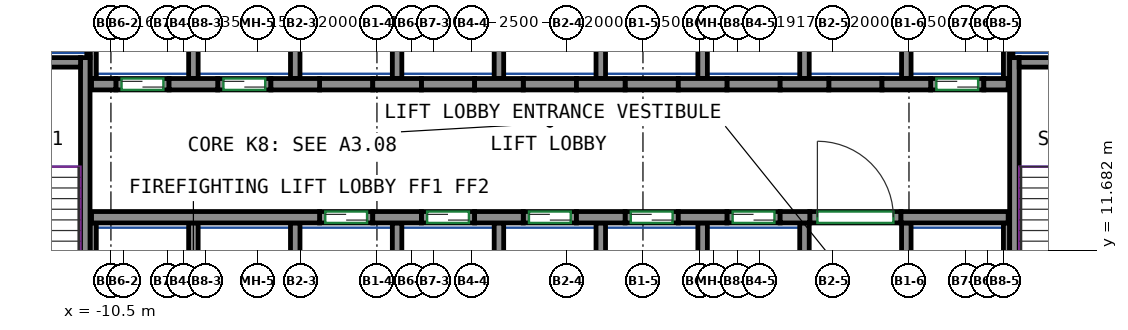
"""IFC4 building model, lengths in metres.
Left out: names, types, materials, properties, quantities, classifications, styles, units other than length and angle.
Written with IfcOpenShell. Run it as: python <this file> out.ifc"""

import sys

from ifc_helpers import new_model, si_unit, direction, frame, frame_2d, origin, place, context, subcontext, project, spatial, rectangle, extrude, source, transform, mapped, element, fill, save


model = new_model("IFC4")
c1 = context("Model", 3, precision=1e-05, world=origin(), true_north=direction((0.0, 1.0)))
c2 = subcontext(c1, "Body", "Model", "MODEL_VIEW")
j1 = project(units=[si_unit("LENGTHUNIT", "METRE"), si_unit("PLANEANGLEUNIT", "RADIAN")], contexts=[c1])
p1 = place(None, origin())
s1 = spatial("IfcSite", under=j1, at=p1, CompositionType="ELEMENT")
p2 = place(p1, origin())
s2 = spatial("IfcBuilding", under=s1, at=p2, CompositionType="ELEMENT")
p3 = place(p2, frame((0.0, 0.0, 35.0)))
s3 = spatial("IfcBuildingStorey", under=s2, at=p3, CompositionType="ELEMENT", Elevation=35.0)
m1 = source(origin(), c2, "Body", "SweptSolid", [
    extrude(rectangle(XDim=7.75, YDim=0.25, at=frame_2d((3.875, 0.0))), origin(), (0.0, 0.0, 1.0), 3.72),
])
p4 = place(p3, frame((-11.175, 9.0, 0.0), z_axis=(0.0, 0.0, 1.0), x_axis=(0.0, 1.0, 0.0)))
e1 = element("IfcWall", 1, at=p4, inside=s3, PredefinedType="SHEAR", context=c2, shape_type="MappedRepresentation", body=[
    mapped(m1, transform((0.0, 0.0, 0.0))),
])
m2 = source(origin(), c2, "Body", "SweptSolid", [
    extrude(rectangle(XDim=3.7, YDim=0.25, at=frame_2d((1.85, 0.0))), origin(), (0.0, 0.0, 1.0), 3.72),
])
p5 = place(p3, frame((-15.0, 16.625, 0.0), z_axis=(0.0, 0.0, 1.0), x_axis=(1.0, 0.0, 0.0)))
e2 = element("IfcWall", 2, at=p5, inside=s3, PredefinedType="SHEAR", context=c2, shape_type="MappedRepresentation", body=[
    mapped(m2, transform((0.0, 0.0, 0.0))),
])
p6 = place(p3, frame((13.275, 9.0, 0.0), z_axis=(0.0, 0.0, 1.0), x_axis=(0.0, 1.0, 0.0)))
e3 = element("IfcWall", 3, at=p6, inside=s3, PredefinedType="SHEAR", context=c2, shape_type="MappedRepresentation", body=[
    mapped(m1, transform((0.0, 0.0, 0.0))),
])
m3 = source(origin(), c2, "Body", "SweptSolid", [
    extrude(rectangle(XDim=3.7, YDim=0.25, at=frame_2d((1.85, 0.0))), origin(), (0.0, 0.0, 1.0), 3.72),
])
p7 = place(p3, frame((13.4, 16.625, 0.0), z_axis=(0.0, 0.0, 1.0), x_axis=(1.0, 0.0, 0.0)))
e4 = element("IfcWall", 4, at=p7, inside=s3, PredefinedType="SHEAR", context=c2, shape_type="MappedRepresentation", body=[
    mapped(m3, transform((0.0, 0.0, 0.0))),
])
m4 = source(origin(), c2, "Body", "SweptSolid", [
    extrude(rectangle(XDim=6.0, YDim=0.3, at=frame_2d((3.0, 0.0))), origin(), (0.0, 0.0, 1.0), 3.72),
])
p8 = place(p3, frame((-11.01, 12.55, 0.0), z_axis=(0.0, 0.0, 1.0), x_axis=(1.0, 0.0, 0.0)))
e5 = element("IfcWall", 5, at=p8, inside=s3, PredefinedType="SHEAR", context=c2, shape_type="MappedRepresentation", body=[
    mapped(m4, transform((0.0, 0.0, 0.0))),
])
m5 = source(origin(), c2, "Body", "SweptSolid", [
    extrude(rectangle(XDim=1.28, YDim=0.3, at=frame_2d((0.64, 0.0))), origin(), (0.0, 0.0, 1.0), 3.72),
])
for number, where, z_axis, x_axis in (
    (6, (-3.61, 12.55, 0.0), (0.0, 0.0, 1.0), (1.0, 0.0, 0.0)),
    (7, (-0.93, 12.55, 0.0), (0.0, 0.0, 1.0), (1.0, 0.0, 0.0)),
    (8, (1.75, 12.55, 0.0), (0.0, 0.0, 1.0), (1.0, 0.0, 0.0)),
    (9, (4.43, 12.55, 0.0), (0.0, 0.0, 1.0), (1.0, 0.0, 0.0)),
):
    element("IfcWall", number, at=place(p3, frame(where, z_axis=z_axis, x_axis=x_axis)), inside=s3, PredefinedType="SHEAR", context=c2, shape_type="MappedRepresentation", body=[
        mapped(m5, transform((0.0, 0.0, 0.0))),
    ])
m6 = source(origin(), c2, "Body", "SweptSolid", [
    extrude(rectangle(XDim=0.78, YDim=0.3, at=frame_2d((0.39, 0.0))), origin(), (0.0, 0.0, 1.0), 3.72),
])
p9 = place(p3, frame((7.11, 12.55, 0.0), z_axis=(0.0, 0.0, 1.0), x_axis=(1.0, 0.0, 0.0)))
e10 = element("IfcWall", 10, at=p9, inside=s3, PredefinedType="SHEAR", context=c2, shape_type="MappedRepresentation", body=[
    mapped(m6, transform((0.0, 0.0, 0.0))),
])
m7 = source(origin(), c2, "Body", "SweptSolid", [
    extrude(rectangle(XDim=2.82, YDim=0.3, at=frame_2d((1.41, 0.0))), origin(), (0.0, 0.0, 1.0), 3.72),
])
p10 = place(p3, frame((10.29, 12.55, 0.0), z_axis=(0.0, 0.0, 1.0), x_axis=(1.0, 0.0, 0.0)))
e11 = element("IfcWall", 11, at=p10, inside=s3, PredefinedType="SHEAR", context=c2, shape_type="MappedRepresentation", body=[
    mapped(m7, transform((0.0, 0.0, 0.0))),
])
m8 = source(origin(), c2, "Body", "SweptSolid", [
    extrude(rectangle(XDim=0.64, YDim=0.3, at=frame_2d((0.32, 0.0))), origin(), (0.0, 0.0, 1.0), 3.72),
])
p11 = place(p3, frame((-11.01, 16.05, 0.0), z_axis=(0.0, 0.0, 1.0), x_axis=(1.0, 0.0, 0.0)))
e12 = element("IfcWall", 12, at=p11, inside=s3, PredefinedType="SHEAR", context=c2, shape_type="MappedRepresentation", body=[
    mapped(m8, transform((0.0, 0.0, 0.0))),
])
for number, where, z_axis, x_axis in (
    (13, (-8.97, 16.05, 0.0), (0.0, 0.0, 1.0), (1.0, 0.0, 0.0)),
    (14, (-6.29, 16.05, 0.0), (0.0, 0.0, 1.0), (1.0, 0.0, 0.0)),
    (15, (-3.61, 16.05, 0.0), (0.0, 0.0, 1.0), (1.0, 0.0, 0.0)),
    (16, (-0.93, 16.05, 0.0), (0.0, 0.0, 1.0), (1.0, 0.0, 0.0)),
    (17, (1.75, 16.05, 0.0), (0.0, 0.0, 1.0), (1.0, 0.0, 0.0)),
    (18, (4.43, 16.05, 0.0), (0.0, 0.0, 1.0), (1.0, 0.0, 0.0)),
):
    element("IfcWall", number, at=place(p3, frame(where, z_axis=z_axis, x_axis=x_axis)), inside=s3, PredefinedType="SHEAR", context=c2, shape_type="MappedRepresentation", body=[
        mapped(m5, transform((0.0, 0.0, 0.0))),
    ])
m9 = source(origin(), c2, "Body", "SweptSolid", [
    extrude(rectangle(XDim=1.28, YDim=0.3, at=frame_2d((0.64, 0.0))), origin(), (0.0, 0.0, 1.0), 3.72),
])
p12 = place(p3, frame((7.11, 16.05, 0.0), z_axis=(0.0, 0.0, 1.0), x_axis=(1.0, 0.0, 0.0)))
e19 = element("IfcWall", 19, at=p12, inside=s3, PredefinedType="SHEAR", context=c2, shape_type="MappedRepresentation", body=[
    mapped(m9, transform((0.0, 0.0, 0.0))),
])
p13 = place(p3, frame((9.79, 16.05, 0.0), z_axis=(0.0, 0.0, 1.0), x_axis=(1.0, 0.0, 0.0)))
e20 = element("IfcWall", 20, at=p13, inside=s3, PredefinedType="SHEAR", context=c2, shape_type="MappedRepresentation", body=[
    mapped(m5, transform((0.0, 0.0, 0.0))),
])
m10 = source(origin(), c2, "Body", "SweptSolid", [
    extrude(rectangle(XDim=0.64, YDim=0.3, at=frame_2d((0.32, 0.0))), origin(), (0.0, 0.0, 1.0), 3.72),
])
p14 = place(p3, frame((12.47, 16.05, 0.0), z_axis=(0.0, 0.0, 1.0), x_axis=(1.0, 0.0, 0.0)))
e21 = element("IfcWall", 21, at=p14, inside=s3, PredefinedType="SHEAR", context=c2, shape_type="MappedRepresentation", body=[
    mapped(m10, transform((0.0, 0.0, 0.0))),
])
m11 = source(origin(), c2, "Body", "SweptSolid", [
    extrude(rectangle(XDim=1.4, YDim=0.3, at=frame_2d((0.7, 0.0))), origin(), (0.0, 0.0, 1.0), 3.72),
])
p15 = place(p3, frame((-5.01, 12.55, 0.0), z_axis=(0.0, 0.0, 1.0), x_axis=(1.0, 0.0, 0.0)))
e22 = element("IfcWall", 22, at=p15, inside=s3, PredefinedType="PARTITIONING", context=c2, shape_type="MappedRepresentation", body=[
    mapped(m11, transform((0.0, 0.0, 0.0))),
])
p16 = place(p15, frame((0.15, 0.0, 0.0)))
e23 = element("IfcOpeningElement", 23, at=p16, cuts=e22, PredefinedType="OPENING", context=c2, shape_type="SweptSolid", body=[
    extrude(rectangle(XDim=1.1, YDim=2.1, at=frame_2d((0.55, 1.05))), frame((0.0, 0.16, 0.0), z_axis=(0.0, -1.0, 0.0), x_axis=(1.0, 0.0, 0.0)), (0.0, 0.0, 1.0), 0.32),
])
m12 = source(origin(), c2, "Body", "SweptSolid", [
    extrude(rectangle(XDim=1.4, YDim=0.3, at=frame_2d((0.7, 0.0))), origin(), (0.0, 0.0, 1.0), 3.72),
])
p17 = place(p3, frame((-2.33, 12.55, 0.0), z_axis=(0.0, 0.0, 1.0), x_axis=(1.0, 0.0, 0.0)))
e24 = element("IfcWall", 24, at=p17, inside=s3, PredefinedType="PARTITIONING", context=c2, shape_type="MappedRepresentation", body=[
    mapped(m12, transform((0.0, 0.0, 0.0))),
])
p18 = place(p17, frame((0.15, 0.0, 0.0)))
e25 = element("IfcOpeningElement", 25, at=p18, cuts=e24, PredefinedType="OPENING", context=c2, shape_type="SweptSolid", body=[
    extrude(rectangle(XDim=1.1, YDim=2.1, at=frame_2d((0.55, 1.05))), frame((0.0, 0.16, 0.0), z_axis=(0.0, -1.0, 0.0), x_axis=(1.0, 0.0, 0.0)), (0.0, 0.0, 1.0), 0.32),
])
p19 = place(p3, frame((0.35, 12.55, 0.0), z_axis=(0.0, 0.0, 1.0), x_axis=(1.0, 0.0, 0.0)))
e26 = element("IfcWall", 26, at=p19, inside=s3, PredefinedType="PARTITIONING", context=c2, shape_type="MappedRepresentation", body=[
    mapped(m11, transform((0.0, 0.0, 0.0))),
])
p20 = place(p19, frame((0.15, 0.0, 0.0)))
e27 = element("IfcOpeningElement", 27, at=p20, cuts=e26, PredefinedType="OPENING", context=c2, shape_type="SweptSolid", body=[
    extrude(rectangle(XDim=1.1, YDim=2.1, at=frame_2d((0.55, 1.05))), frame((0.0, 0.16, 0.0), z_axis=(0.0, -1.0, 0.0), x_axis=(1.0, 0.0, 0.0)), (0.0, 0.0, 1.0), 0.32),
])
p21 = place(p3, frame((3.03, 12.55, 0.0), z_axis=(0.0, 0.0, 1.0), x_axis=(1.0, 0.0, 0.0)))
e28 = element("IfcWall", 28, at=p21, inside=s3, PredefinedType="PARTITIONING", context=c2, shape_type="MappedRepresentation", body=[
    mapped(m11, transform((0.0, 0.0, 0.0))),
])
p22 = place(p21, frame((0.15, 0.0, 0.0)))
e29 = element("IfcOpeningElement", 29, at=p22, cuts=e28, PredefinedType="OPENING", context=c2, shape_type="SweptSolid", body=[
    extrude(rectangle(XDim=1.1, YDim=2.1, at=frame_2d((0.55, 1.05))), frame((0.0, 0.16, 0.0), z_axis=(0.0, -1.0, 0.0), x_axis=(1.0, 0.0, 0.0)), (0.0, 0.0, 1.0), 0.32),
])
p23 = place(p3, frame((5.71, 12.55, 0.0), z_axis=(0.0, 0.0, 1.0), x_axis=(1.0, 0.0, 0.0)))
e30 = element("IfcWall", 30, at=p23, inside=s3, PredefinedType="PARTITIONING", context=c2, shape_type="MappedRepresentation", body=[
    mapped(m12, transform((0.0, 0.0, 0.0))),
])
p24 = place(p23, frame((0.15, 0.0, 0.0)))
e31 = element("IfcOpeningElement", 31, at=p24, cuts=e30, PredefinedType="OPENING", context=c2, shape_type="SweptSolid", body=[
    extrude(rectangle(XDim=1.1, YDim=2.1, at=frame_2d((0.55, 1.05))), frame((0.0, 0.16, 0.0), z_axis=(0.0, -1.0, 0.0), x_axis=(1.0, 0.0, 0.0)), (0.0, 0.0, 1.0), 0.32),
])
p25 = place(p3, frame((11.07, 16.05, 0.0), z_axis=(0.0, 0.0, 1.0), x_axis=(1.0, 0.0, 0.0)))
e32 = element("IfcWall", 32, at=p25, inside=s3, PredefinedType="PARTITIONING", context=c2, shape_type="MappedRepresentation", body=[
    mapped(m11, transform((0.0, 0.0, 0.0))),
])
p26 = place(p25, frame((0.15, 0.0, 0.0)))
e33 = element("IfcOpeningElement", 33, at=p26, cuts=e32, PredefinedType="OPENING", context=c2, shape_type="SweptSolid", body=[
    extrude(rectangle(XDim=1.1, YDim=2.1, at=frame_2d((0.55, 1.05))), frame((0.0, 0.16, 0.0), z_axis=(0.0, -1.0, 0.0), x_axis=(1.0, 0.0, 0.0)), (0.0, 0.0, 1.0), 0.32),
])
p27 = place(p3, frame((-10.37, 16.05, 0.0), z_axis=(0.0, 0.0, 1.0), x_axis=(1.0, 0.0, 0.0)))
e34 = element("IfcWall", 34, at=p27, inside=s3, PredefinedType="PARTITIONING", context=c2, shape_type="MappedRepresentation", body=[
    mapped(m12, transform((0.0, 0.0, 0.0))),
])
p28 = place(p27, frame((0.15, 0.0, 0.0)))
e35 = element("IfcOpeningElement", 35, at=p28, cuts=e34, PredefinedType="OPENING", context=c2, shape_type="SweptSolid", body=[
    extrude(rectangle(XDim=1.1, YDim=2.1, at=frame_2d((0.55, 1.05))), frame((0.0, 0.16, 0.0), z_axis=(0.0, -1.0, 0.0), x_axis=(1.0, 0.0, 0.0)), (0.0, 0.0, 1.0), 0.32),
])
p29 = place(p3, frame((-7.69, 16.05, 0.0), z_axis=(0.0, 0.0, 1.0), x_axis=(1.0, 0.0, 0.0)))
e36 = element("IfcWall", 36, at=p29, inside=s3, PredefinedType="PARTITIONING", context=c2, shape_type="MappedRepresentation", body=[
    mapped(m11, transform((0.0, 0.0, 0.0))),
])
p30 = place(p29, frame((0.15, 0.0, 0.0)))
e37 = element("IfcOpeningElement", 37, at=p30, cuts=e36, PredefinedType="OPENING", context=c2, shape_type="SweptSolid", body=[
    extrude(rectangle(XDim=1.1, YDim=2.1, at=frame_2d((0.55, 1.05))), frame((0.0, 0.16, 0.0), z_axis=(0.0, -1.0, 0.0), x_axis=(1.0, 0.0, 0.0)), (0.0, 0.0, 1.0), 0.32),
])
m13 = source(origin(), c2, "Body", "SweptSolid", [
    extrude(rectangle(XDim=2.4, YDim=0.3, at=frame_2d((1.2, 0.0))), origin(), (0.0, 0.0, 1.0), 3.72),
])
p31 = place(p3, frame((7.89, 12.55, 0.0), z_axis=(0.0, 0.0, 1.0), x_axis=(1.0, 0.0, 0.0)))
e38 = element("IfcWall", 38, at=p31, inside=s3, PredefinedType="PARTITIONING", context=c2, shape_type="MappedRepresentation", body=[
    mapped(m13, transform((0.0, 0.0, 0.0))),
])
p32 = place(p31, frame((0.2, 0.0, 0.0)))
e39 = element("IfcOpeningElement", 39, at=p32, cuts=e38, PredefinedType="OPENING", context=c2, shape_type="SweptSolid", body=[
    extrude(rectangle(XDim=2.0, YDim=2.1, at=frame_2d((1.0, 1.05))), frame((0.0, 0.16, 0.0), z_axis=(0.0, -1.0, 0.0), x_axis=(1.0, 0.0, 0.0)), (0.0, 0.0, 1.0), 0.32),
])
p33 = place(p3, frame((-5.01, 16.05, 0.0), z_axis=(0.0, 0.0, 1.0), x_axis=(1.0, 0.0, 0.0)))
e40 = element("IfcWall", 40, at=p33, inside=s3, PredefinedType="PARTITIONING", context=c2, shape_type="MappedRepresentation", body=[
    mapped(m11, transform((0.0, 0.0, 0.0))),
])
p34 = place(p3, frame((-2.33, 16.05, 0.0), z_axis=(0.0, 0.0, 1.0), x_axis=(1.0, 0.0, 0.0)))
e41 = element("IfcWall", 41, at=p34, inside=s3, PredefinedType="PARTITIONING", context=c2, shape_type="MappedRepresentation", body=[
    mapped(m12, transform((0.0, 0.0, 0.0))),
])
for number, where, z_axis, x_axis in (
    (42, (0.35, 16.05, 0.0), (0.0, 0.0, 1.0), (1.0, 0.0, 0.0)),
    (43, (3.03, 16.05, 0.0), (0.0, 0.0, 1.0), (1.0, 0.0, 0.0)),
):
    element("IfcWall", number, at=place(p3, frame(where, z_axis=z_axis, x_axis=x_axis)), inside=s3, PredefinedType="PARTITIONING", context=c2, shape_type="MappedRepresentation", body=[
        mapped(m11, transform((0.0, 0.0, 0.0))),
    ])
for number, where, z_axis, x_axis in (
    (44, (5.71, 16.05, 0.0), (0.0, 0.0, 1.0), (1.0, 0.0, 0.0)),
    (45, (8.39, 16.05, 0.0), (0.0, 0.0, 1.0), (1.0, 0.0, 0.0)),
):
    element("IfcWall", number, at=place(p3, frame(where, z_axis=z_axis, x_axis=x_axis)), inside=s3, PredefinedType="PARTITIONING", context=c2, shape_type="MappedRepresentation", body=[
        mapped(m12, transform((0.0, 0.0, 0.0))),
    ])
m14 = source(origin(), c2, "Body", "SweptSolid", [
    extrude(rectangle(XDim=3.275, YDim=0.165, at=frame_2d((1.638, 0.0))), origin(), (0.0, 0.0, 1.0), 3.72),
])
for number, where, z_axis, x_axis in (
    (46, (13.067, 16.2, 0.0), (0.0, 0.0, 1.0), (0.0, 1.0, 0.0)),
    (47, (-10.968, 16.2, 0.0), (0.0, 0.0, 1.0), (0.0, 1.0, 0.0)),
):
    element("IfcWall", number, at=place(p3, frame(where, z_axis=z_axis, x_axis=x_axis)), inside=s3, PredefinedType="PARTITIONING", context=c2, shape_type="MappedRepresentation", body=[
        mapped(m14, transform((0.0, 0.0, 0.0))),
    ])
m15 = source(origin(), c2, "Body", "SweptSolid", [
    extrude(rectangle(XDim=3.275, YDim=0.25, at=frame_2d((1.638, 0.0))), origin(), (0.0, 0.0, 1.0), 3.72),
])
p35 = place(p3, frame((10.43, 16.2, 0.0), z_axis=(0.0, 0.0, 1.0), x_axis=(0.0, 1.0, 0.0)))
e48 = element("IfcWall", 48, at=p35, inside=s3, PredefinedType="PARTITIONING", context=c2, shape_type="MappedRepresentation", body=[
    mapped(m15, transform((0.0, 0.0, 0.0))),
])
m16 = source(origin(), c2, "Body", "SweptSolid", [
    extrude(rectangle(XDim=2.725, YDim=0.085, at=frame_2d((1.363, 0.0))), origin(), (0.0, 0.0, 1.0), 3.72),
])
p36 = place(p3, frame((13.192, 16.75, 0.0), z_axis=(0.0, 0.0, 1.0), x_axis=(0.0, 1.0, 0.0)))
e49 = element("IfcWall", 49, at=p36, inside=s3, PredefinedType="PARTITIONING", context=c2, shape_type="MappedRepresentation", body=[
    mapped(m16, transform((0.0, 0.0, 0.0))),
])
for number, where, z_axis, x_axis in (
    (50, (2.39, 16.2, 0.0), (0.0, 0.0, 1.0), (0.0, 1.0, 0.0)),
    (51, (5.07, 16.2, 0.0), (0.0, 0.0, 1.0), (0.0, 1.0, 0.0)),
    (52, (7.75, 16.2, 0.0), (0.0, 0.0, 1.0), (0.0, 1.0, 0.0)),
    (53, (-0.29, 16.2, 0.0), (0.0, 0.0, 1.0), (0.0, 1.0, 0.0)),
):
    element("IfcWall", number, at=place(p3, frame(where, z_axis=z_axis, x_axis=x_axis)), inside=s3, PredefinedType="PARTITIONING", context=c2, shape_type="MappedRepresentation", body=[
        mapped(m15, transform((0.0, 0.0, 0.0))),
    ])
p37 = place(p3, frame((-11.093, 16.75, 0.0), z_axis=(0.0, 0.0, 1.0), x_axis=(0.0, 1.0, 0.0)))
e54 = element("IfcWall", 54, at=p37, inside=s3, PredefinedType="PARTITIONING", context=c2, shape_type="MappedRepresentation", body=[
    mapped(m16, transform((0.0, 0.0, 0.0))),
])
for number, where, z_axis, x_axis in (
    (55, (-2.97, 16.2, 0.0), (0.0, 0.0, 1.0), (0.0, 1.0, 0.0)),
    (56, (-5.65, 16.2, 0.0), (0.0, 0.0, 1.0), (0.0, 1.0, 0.0)),
    (57, (-8.33, 16.2, 0.0), (0.0, 0.0, 1.0), (0.0, 1.0, 0.0)),
):
    element("IfcWall", number, at=place(p3, frame(where, z_axis=z_axis, x_axis=x_axis)), inside=s3, PredefinedType="PARTITIONING", context=c2, shape_type="MappedRepresentation", body=[
        mapped(m15, transform((0.0, 0.0, 0.0))),
    ])
m17 = source(origin(), c2, "Body", "SweptSolid", [
    extrude(rectangle(XDim=3.4, YDim=0.25, at=frame_2d((1.7, 0.0))), origin(), (0.0, 0.0, 1.0), 3.72),
])
p38 = place(p3, frame((10.43, 9.0, 0.0), z_axis=(0.0, 0.0, 1.0), x_axis=(0.0, 1.0, 0.0)))
e58 = element("IfcWall", 58, at=p38, inside=s3, PredefinedType="PARTITIONING", context=c2, shape_type="MappedRepresentation", body=[
    mapped(m17, transform((0.0, 0.0, 0.0))),
])
m18 = source(origin(), c2, "Body", "SweptSolid", [
    extrude(rectangle(XDim=3.4, YDim=0.165, at=frame_2d((1.7, 0.0))), origin(), (0.0, 0.0, 1.0), 3.72),
])
p39 = place(p3, frame((13.067, 9.0, 0.0), z_axis=(0.0, 0.0, 1.0), x_axis=(0.0, 1.0, 0.0)))
e59 = element("IfcWall", 59, at=p39, inside=s3, PredefinedType="PARTITIONING", context=c2, shape_type="MappedRepresentation", body=[
    mapped(m18, transform((0.0, 0.0, 0.0))),
])
for number, where, z_axis, x_axis in (
    (60, (2.39, 9.0, 0.0), (0.0, 0.0, 1.0), (0.0, 1.0, 0.0)),
    (61, (5.07, 9.0, 0.0), (0.0, 0.0, 1.0), (0.0, 1.0, 0.0)),
    (62, (7.75, 9.0, 0.0), (0.0, 0.0, 1.0), (0.0, 1.0, 0.0)),
    (63, (-0.29, 9.0, 0.0), (0.0, 0.0, 1.0), (0.0, 1.0, 0.0)),
):
    element("IfcWall", number, at=place(p3, frame(where, z_axis=z_axis, x_axis=x_axis)), inside=s3, PredefinedType="PARTITIONING", context=c2, shape_type="MappedRepresentation", body=[
        mapped(m17, transform((0.0, 0.0, 0.0))),
    ])
p40 = place(p3, frame((-10.968, 9.0, 0.0), z_axis=(0.0, 0.0, 1.0), x_axis=(0.0, 1.0, 0.0)))
e64 = element("IfcWall", 64, at=p40, inside=s3, PredefinedType="PARTITIONING", context=c2, shape_type="MappedRepresentation", body=[
    mapped(m18, transform((0.0, 0.0, 0.0))),
])
for number, where, z_axis, x_axis in (
    (65, (-2.97, 9.0, 0.0), (0.0, 0.0, 1.0), (0.0, 1.0, 0.0)),
    (66, (-5.65, 9.0, 0.0), (0.0, 0.0, 1.0), (0.0, 1.0, 0.0)),
    (67, (-8.33, 9.0, 0.0), (0.0, 0.0, 1.0), (0.0, 1.0, 0.0)),
):
    element("IfcWall", number, at=place(p3, frame(where, z_axis=z_axis, x_axis=x_axis)), inside=s3, PredefinedType="PARTITIONING", context=c2, shape_type="MappedRepresentation", body=[
        mapped(m17, transform((0.0, 0.0, 0.0))),
    ])
p41 = place(p32, origin())
e68 = element("IfcDoor", 68, at=p41, inside=s3, OperationType="DOUBLE_DOOR_SINGLE_SWING", PredefinedType="DOOR", context=c2, shape_type="SweptSolid", body=[
    extrude(rectangle(XDim=2.0, YDim=2.1, at=frame_2d((1.0, 1.05))), frame((0.0, 0.025, 0.0), z_axis=(0.0, -1.0, 0.0), x_axis=(1.0, 0.0, 0.0)), (0.0, 0.0, 1.0), 0.05),
])
fill(e39, e68)
p42 = place(p16, origin())
e69 = element("IfcDoor", 69, at=p42, inside=s3, OperationType="DOUBLE_DOOR_SLIDING", PredefinedType="DOOR", context=c2, shape_type="SweptSolid", body=[
    extrude(rectangle(XDim=1.1, YDim=2.1, at=frame_2d((0.55, 1.05))), frame((0.0, 0.025, 0.0), z_axis=(0.0, -1.0, 0.0), x_axis=(1.0, 0.0, 0.0)), (0.0, 0.0, 1.0), 0.05),
])
fill(e23, e69)
p43 = place(p18, origin())
e70 = element("IfcDoor", 70, at=p43, inside=s3, OperationType="DOUBLE_DOOR_SLIDING", PredefinedType="DOOR", context=c2, shape_type="SweptSolid", body=[
    extrude(rectangle(XDim=1.1, YDim=2.1, at=frame_2d((0.55, 1.05))), frame((0.0, 0.025, 0.0), z_axis=(0.0, -1.0, 0.0), x_axis=(1.0, 0.0, 0.0)), (0.0, 0.0, 1.0), 0.05),
])
fill(e25, e70)
p44 = place(p20, origin())
e71 = element("IfcDoor", 71, at=p44, inside=s3, OperationType="DOUBLE_DOOR_SLIDING", PredefinedType="DOOR", context=c2, shape_type="SweptSolid", body=[
    extrude(rectangle(XDim=1.1, YDim=2.1, at=frame_2d((0.55, 1.05))), frame((0.0, 0.025, 0.0), z_axis=(0.0, -1.0, 0.0), x_axis=(1.0, 0.0, 0.0)), (0.0, 0.0, 1.0), 0.05),
])
fill(e27, e71)
p45 = place(p22, origin())
e72 = element("IfcDoor", 72, at=p45, inside=s3, OperationType="DOUBLE_DOOR_SLIDING", PredefinedType="DOOR", context=c2, shape_type="SweptSolid", body=[
    extrude(rectangle(XDim=1.1, YDim=2.1, at=frame_2d((0.55, 1.05))), frame((0.0, 0.025, 0.0), z_axis=(0.0, -1.0, 0.0), x_axis=(1.0, 0.0, 0.0)), (0.0, 0.0, 1.0), 0.05),
])
fill(e29, e72)
p46 = place(p24, origin())
e73 = element("IfcDoor", 73, at=p46, inside=s3, OperationType="DOUBLE_DOOR_SLIDING", PredefinedType="DOOR", context=c2, shape_type="SweptSolid", body=[
    extrude(rectangle(XDim=1.1, YDim=2.1, at=frame_2d((0.55, 1.05))), frame((0.0, 0.025, 0.0), z_axis=(0.0, -1.0, 0.0), x_axis=(1.0, 0.0, 0.0)), (0.0, 0.0, 1.0), 0.05),
])
fill(e31, e73)
p47 = place(p26, origin())
e74 = element("IfcDoor", 74, at=p47, inside=s3, OperationType="DOUBLE_DOOR_SLIDING", PredefinedType="DOOR", context=c2, shape_type="SweptSolid", body=[
    extrude(rectangle(XDim=1.1, YDim=2.1, at=frame_2d((0.55, 1.05))), frame((0.0, 0.025, 0.0), z_axis=(0.0, -1.0, 0.0), x_axis=(1.0, 0.0, 0.0)), (0.0, 0.0, 1.0), 0.05),
])
fill(e33, e74)
p48 = place(p28, origin())
e75 = element("IfcDoor", 75, at=p48, inside=s3, OperationType="DOUBLE_DOOR_SLIDING", PredefinedType="DOOR", context=c2, shape_type="SweptSolid", body=[
    extrude(rectangle(XDim=1.1, YDim=2.1, at=frame_2d((0.55, 1.05))), frame((0.0, 0.025, 0.0), z_axis=(0.0, -1.0, 0.0), x_axis=(1.0, 0.0, 0.0)), (0.0, 0.0, 1.0), 0.05),
])
fill(e35, e75)
p49 = place(p30, origin())
e76 = element("IfcDoor", 76, at=p49, inside=s3, OperationType="DOUBLE_DOOR_SLIDING", PredefinedType="DOOR", context=c2, shape_type="SweptSolid", body=[
    extrude(rectangle(XDim=1.1, YDim=2.1, at=frame_2d((0.55, 1.05))), frame((0.0, 0.025, 0.0), z_axis=(0.0, -1.0, 0.0), x_axis=(1.0, 0.0, 0.0)), (0.0, 0.0, 1.0), 0.05),
])
fill(e37, e76)
save(model, sys.argv[1])
